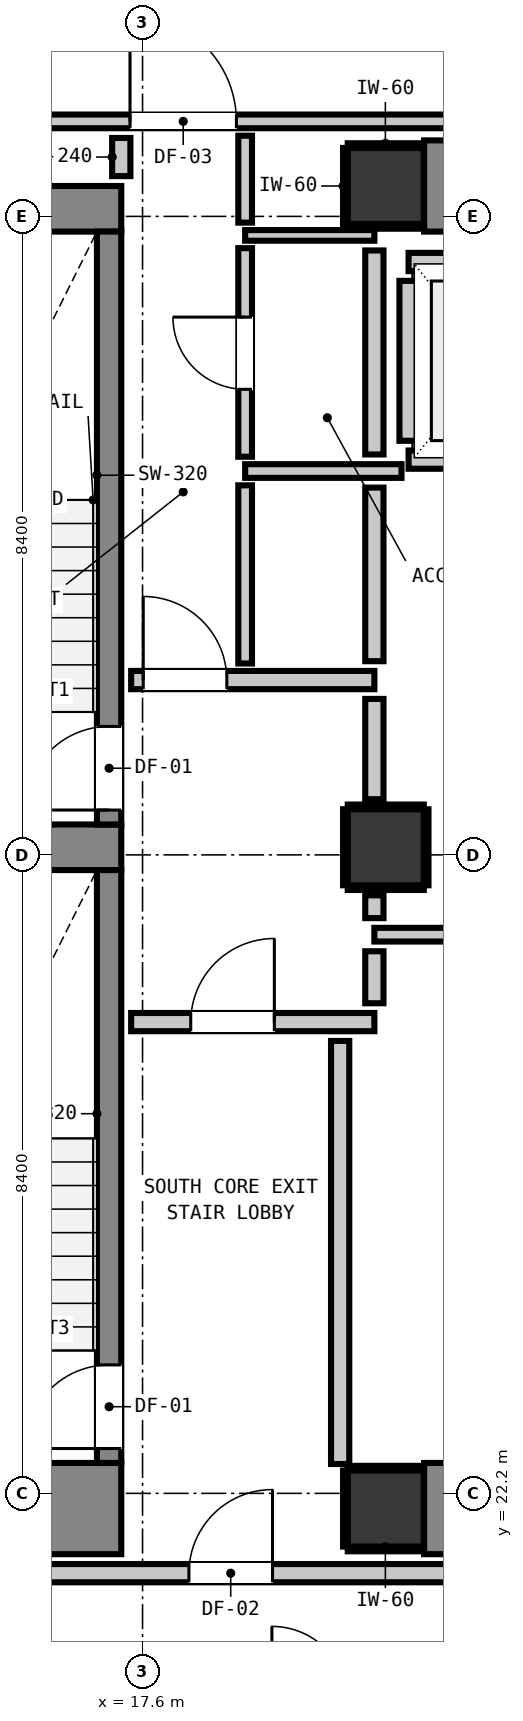
"""IFC4 building model, lengths in metres.
Left out: names, types, materials, properties, quantities, classifications, styles, units other than length and angle.
Written with IfcOpenShell. Run it as: python <this file> out.ifc"""

import sys

from ifc_helpers import new_model, si_unit, direction, frame, frame_2d, origin, origin_2d, place, context, subcontext, project, spatial, rectangle, extrude, element, fill, save


model = new_model("IFC4")
c1 = context("Model", 3, precision=1e-05, world=origin(), true_north=direction((0.0, 1.0)))
c2 = subcontext(c1, "Body", "Model", "MODEL_VIEW")
j1 = project(units=[si_unit("LENGTHUNIT", "METRE"), si_unit("PLANEANGLEUNIT", "RADIAN")], contexts=[c1])
p1 = place(None, origin())
s1 = spatial("IfcSite", under=j1, at=p1, CompositionType="ELEMENT")
p2 = place(p1, origin())
s2 = spatial("IfcBuilding", under=s1, at=p2, CompositionType="ELEMENT")
p3 = place(p2, frame((0.0, 0.0, 25.32)))
s3 = spatial("IfcBuildingStorey", under=s2, at=p3, CompositionType="ELEMENT", Elevation=25.32)
for number, where, z_axis, x_axis in (
    (1, (20.8, 22.0, 0.0), (0.0, 0.0, 1.0), (1.0, 0.0, 0.0)),
    (2, (20.8, 39.4, 0.0), (0.0, 0.0, 1.0), (1.0, 0.0, 0.0)),
):
    element("IfcColumn", number, at=place(p3, frame(where, z_axis=z_axis, x_axis=x_axis)), inside=s3, PredefinedType="COLUMN", context=c2, shape_type="SweptSolid", body=[
        extrude(rectangle(XDim=1.0, YDim=1.0, at=origin_2d()), origin(), (0.0, 0.0, 1.0), 3.32),
    ])
p4 = place(p3, frame((13.24, 22.0, 0.0), z_axis=(0.0, 0.0, 1.0), x_axis=(1.0, 0.0, 0.0)))
e3 = element("IfcWall", 3, at=p4, inside=s3, PredefinedType="SHEAR", context=c2, shape_type="SweptSolid", body=[
    extrude(rectangle(XDim=4.08, YDim=1.2, at=frame_2d((2.04, 0.0))), origin(), (0.0, 0.0, 1.0), 3.32),
])
p5 = place(p3, frame((13.24, 39.1, 0.0), z_axis=(0.0, 0.0, 1.0), x_axis=(1.0, 0.0, 0.0)))
e4 = element("IfcWall", 4, at=p5, inside=s3, PredefinedType="SHEAR", context=c2, shape_type="SweptSolid", body=[
    extrude(rectangle(XDim=4.08, YDim=0.6, at=frame_2d((2.04, 0.0))), origin(), (0.0, 0.0, 1.0), 3.32),
])
p6 = place(p3, frame((13.905, 30.7, 0.0), z_axis=(0.0, 0.0, 1.0), x_axis=(1.0, 0.0, 0.0)))
e5 = element("IfcWall", 5, at=p6, inside=s3, PredefinedType="SHEAR", context=c2, shape_type="SweptSolid", body=[
    extrude(rectangle(XDim=3.415, YDim=0.6, at=frame_2d((1.708, 0.0))), origin(), (0.0, 0.0, 1.0), 3.32),
])
for number, where, z_axis, x_axis in (
    (6, (21.305, 22.0, 0.0), (0.0, 0.0, 1.0), (1.0, 0.0, 0.0)),
    (7, (21.305, 39.4, 0.0), (0.0, 0.0, 1.0), (1.0, 0.0, 0.0)),
):
    element("IfcWall", number, at=place(p3, frame(where, z_axis=z_axis, x_axis=x_axis)), inside=s3, PredefinedType="SHEAR", context=c2, shape_type="SweptSolid", body=[
        extrude(rectangle(XDim=7.39, YDim=1.2, at=frame_2d((3.695, 0.0))), origin(), (0.0, 0.0, 1.0), 3.32),
    ])
p7 = place(p3, frame((17.16, 31.0, 0.0), z_axis=(0.0, 0.0, 1.0), x_axis=(0.0, 1.0, 0.0)))
e8 = element("IfcWall", 8, at=p7, inside=s3, PredefinedType="SHEAR", context=c2, shape_type="SweptSolid", body=[
    extrude(rectangle(XDim=7.8, YDim=0.32, at=frame_2d((3.9, 0.0))), origin(), (0.0, 0.0, 1.0), 3.32),
])
p8 = place(p7, frame((0.19, 0.0, 0.0)))
e9 = element("IfcOpeningElement", 9, at=p8, cuts=e8, PredefinedType="OPENING", context=c2, shape_type="SweptSolid", body=[
    extrude(rectangle(XDim=1.1, YDim=2.15, at=frame_2d((0.55, 1.075))), frame((0.0, 0.17, 0.0), z_axis=(0.0, -1.0, 0.0), x_axis=(1.0, 0.0, 0.0)), (0.0, 0.0, 1.0), 0.34),
])
p9 = place(p3, frame((17.16, 22.6, 0.0), z_axis=(0.0, 0.0, 1.0), x_axis=(0.0, 1.0, 0.0)))
e10 = element("IfcWall", 10, at=p9, inside=s3, PredefinedType="SHEAR", context=c2, shape_type="SweptSolid", body=[
    extrude(rectangle(XDim=7.8, YDim=0.32, at=frame_2d((3.9, 0.0))), origin(), (0.0, 0.0, 1.0), 3.32),
])
p10 = place(p9, frame((0.19, 0.0, 0.0)))
e11 = element("IfcOpeningElement", 11, at=p10, cuts=e10, PredefinedType="OPENING", context=c2, shape_type="SweptSolid", body=[
    extrude(rectangle(XDim=1.1, YDim=2.15, at=frame_2d((0.55, 1.075))), frame((0.0, 0.17, 0.0), z_axis=(0.0, -1.0, 0.0), x_axis=(1.0, 0.0, 0.0)), (0.0, 0.0, 1.0), 0.34),
])
p11 = place(p3, frame((20.8, 30.7, 0.0), z_axis=(0.0, 0.0, 1.0), x_axis=(1.0, 0.0, 0.0)))
e12 = element("IfcColumn", 12, at=p11, inside=s3, PredefinedType="COLUMN", context=c2, shape_type="SweptSolid", body=[
    extrude(rectangle(XDim=1.0, YDim=1.0, at=origin_2d()), origin(), (0.0, 0.0, 1.0), 3.32),
])
for number, where, z_axis, x_axis in (
    (13, (21.1, 35.8, 0.0), (0.0, 0.0, 1.0), (1.0, 0.0, 0.0)),
    (14, (21.1, 38.4, 0.0), (0.0, 0.0, 1.0), (1.0, 0.0, 0.0)),
):
    element("IfcWall", number, at=place(p3, frame(where, z_axis=z_axis, x_axis=x_axis)), inside=s3, PredefinedType="PARTITIONING", context=c2, shape_type="SweptSolid", body=[
        extrude(rectangle(XDim=2.2, YDim=0.24, at=frame_2d((1.1, 0.0))), origin(), (0.0, 0.0, 1.0), 3.06),
    ])
p12 = place(p3, frame((21.1, 36.048, 0.0), z_axis=(0.0, 0.0, 1.0), x_axis=(0.0, 1.0, 0.0)))
e15 = element("IfcWall", 15, at=p12, inside=s3, PredefinedType="PARTITIONING", context=c2, shape_type="SweptSolid", body=[
    extrude(rectangle(XDim=2.104, YDim=0.24, at=frame_2d((1.052, 0.0))), origin(), (0.0, 0.0, 1.0), 2.295),
])
p13 = place(p3, frame((1.827, 21.15, 0.0), z_axis=(0.0, 0.0, 1.0), x_axis=(1.0, 0.0, 0.0)))
e16 = element("IfcWall", 16, at=p13, inside=s3, PredefinedType="PARTITIONING", context=c2, shape_type="SweptSolid", body=[
    extrude(rectangle(XDim=42.146, YDim=0.24, at=frame_2d((21.073, 0.0))), origin(), (0.0, 0.0, 1.0), 3.06),
])
p14 = place(p13, frame((16.383, 0.0, 0.0)))
e17 = element("IfcOpeningElement", 17, at=p14, cuts=e16, PredefinedType="OPENING", context=c2, shape_type="SweptSolid", body=[
    extrude(rectangle(XDim=1.1, YDim=2.15, at=frame_2d((0.55, 1.075))), frame((0.0, 0.13, 0.0), z_axis=(0.0, -1.0, 0.0), x_axis=(1.0, 0.0, 0.0)), (0.0, 0.0, 1.0), 0.26),
])
p15 = place(p13, frame((8.647, 0.0, 0.0)))
e18 = element("IfcOpeningElement", 18, at=p15, cuts=e16, PredefinedType="OPENING", context=c2, shape_type="SweptSolid", body=[
    extrude(rectangle(XDim=1.4, YDim=2.15, at=frame_2d((0.7, 1.075))), frame((0.0, 0.13, 0.0), z_axis=(0.0, -1.0, 0.0), x_axis=(1.0, 0.0, 0.0)), (0.0, 0.0, 1.0), 0.26),
])
p16 = place(p13, frame((38.524, 0.0, 0.0)))
e19 = element("IfcOpeningElement", 19, at=p16, cuts=e16, PredefinedType="OPENING", context=c2, shape_type="SweptSolid", body=[
    extrude(rectangle(XDim=1.0, YDim=2.15, at=frame_2d((0.5, 1.075))), frame((0.0, 0.13, 0.0), z_axis=(0.0, -1.0, 0.0), x_axis=(1.0, 0.0, 0.0)), (0.0, 0.0, 1.0), 0.26),
])
p17 = place(p3, frame((17.45, 28.4, 0.0), z_axis=(0.0, 0.0, 1.0), x_axis=(1.0, 0.0, 0.0)))
e20 = element("IfcWall", 20, at=p17, inside=s3, PredefinedType="PARTITIONING", context=c2, shape_type="SweptSolid", body=[
    extrude(rectangle(XDim=3.2, YDim=0.24, at=frame_2d((1.6, 0.0))), origin(), (0.0, 0.0, 1.0), 3.06),
])
p18 = place(p17, frame((0.784, 0.0, 0.0)))
e21 = element("IfcOpeningElement", 21, at=p18, cuts=e20, PredefinedType="OPENING", context=c2, shape_type="SweptSolid", body=[
    extrude(rectangle(XDim=1.1, YDim=2.15, at=frame_2d((0.55, 1.075))), frame((0.0, 0.13, 0.0), z_axis=(0.0, -1.0, 0.0), x_axis=(1.0, 0.0, 0.0)), (0.0, 0.0, 1.0), 0.26),
])
p19 = place(p3, frame((17.45, 32.9, 0.0), z_axis=(0.0, 0.0, 1.0), x_axis=(1.0, 0.0, 0.0)))
e22 = element("IfcWall", 22, at=p19, inside=s3, PredefinedType="PARTITIONING", context=c2, shape_type="SweptSolid", body=[
    extrude(rectangle(XDim=3.2, YDim=0.24, at=frame_2d((1.6, 0.0))), origin(), (0.0, 0.0, 1.0), 3.06),
])
p20 = place(p19, frame((0.159, 0.0, 0.0)))
e23 = element("IfcOpeningElement", 23, at=p20, cuts=e22, PredefinedType="OPENING", context=c2, shape_type="SweptSolid", body=[
    extrude(rectangle(XDim=1.1, YDim=2.15, at=frame_2d((0.55, 1.075))), frame((0.0, 0.13, 0.0), z_axis=(0.0, -1.0, 0.0), x_axis=(1.0, 0.0, 0.0)), (0.0, 0.0, 1.0), 0.26),
])
p21 = place(p3, frame((20.65, 29.55, 0.0), z_axis=(0.0, 0.0, 1.0), x_axis=(1.0, 0.0, 0.0)))
e24 = element("IfcWall", 24, at=p21, inside=s3, PredefinedType="PARTITIONING", context=c2, shape_type="SweptSolid", body=[
    extrude(rectangle(XDim=9.325, YDim=0.18, at=frame_2d((4.663, 0.0))), origin(), (0.0, 0.0, 1.0), 3.06),
])
p22 = place(p3, frame((18.95, 35.65, 0.0), z_axis=(0.0, 0.0, 1.0), x_axis=(1.0, 0.0, 0.0)))
e25 = element("IfcWall", 25, at=p22, inside=s3, PredefinedType="PARTITIONING", context=c2, shape_type="SweptSolid", body=[
    extrude(rectangle(XDim=2.057, YDim=0.18, at=frame_2d((1.029, 0.0))), origin(), (0.0, 0.0, 1.0), 3.06),
])
p23 = place(p3, frame((12.989, 40.25, 0.0), z_axis=(0.0, 0.0, 1.0), x_axis=(1.0, 0.0, 0.0)))
e26 = element("IfcWall", 26, at=p23, inside=s3, PredefinedType="PARTITIONING", context=c2, shape_type="SweptSolid", body=[
    extrude(rectangle(XDim=30.984, YDim=0.18, at=frame_2d((15.492, 0.0))), origin(), (0.0, 0.0, 1.0), 3.06),
])
p24 = place(p23, frame((4.446, 0.0, 0.0)))
e27 = element("IfcOpeningElement", 27, at=p24, cuts=e26, PredefinedType="OPENING", context=c2, shape_type="SweptSolid", body=[
    extrude(rectangle(XDim=1.4, YDim=2.15, at=frame_2d((0.7, 1.075))), frame((0.0, 0.1, 0.0), z_axis=(0.0, -1.0, 0.0), x_axis=(1.0, 0.0, 0.0)), (0.0, 0.0, 1.0), 0.2),
])
p25 = place(p23, frame((27.362, 0.0, 0.0)))
e28 = element("IfcOpeningElement", 28, at=p25, cuts=e26, PredefinedType="OPENING", context=c2, shape_type="SweptSolid", body=[
    extrude(rectangle(XDim=1.0, YDim=2.15, at=frame_2d((0.5, 1.075))), frame((0.0, 0.1, 0.0), z_axis=(0.0, -1.0, 0.0), x_axis=(1.0, 0.0, 0.0)), (0.0, 0.0, 1.0), 0.2),
])
p26 = place(p3, frame((18.95, 38.75, 0.0), z_axis=(0.0, 0.0, 1.0), x_axis=(1.0, 0.0, 0.0)))
e29 = element("IfcWall", 29, at=p26, inside=s3, PredefinedType="PARTITIONING", context=c2, shape_type="SweptSolid", body=[
    extrude(rectangle(XDim=1.7, YDim=0.14, at=frame_2d((0.85, 0.0))), origin(), (0.0, 0.0, 1.0), 3.06),
])
p27 = place(p3, frame((17.32, 39.53, 0.0), z_axis=(0.0, 0.0, 1.0), x_axis=(0.0, 1.0, 0.0)))
e30 = element("IfcWall", 30, at=p27, inside=s3, PredefinedType="PARTITIONING", context=c2, shape_type="SweptSolid", body=[
    extrude(rectangle(XDim=0.502, YDim=0.24, at=frame_2d((0.251, 0.0))), origin(), (0.0, 0.0, 1.0), 3.06),
])
p28 = place(p3, frame((20.2, 22.586, 0.0), z_axis=(0.0, 0.0, 1.0), x_axis=(0.0, 1.0, 0.0)))
e31 = element("IfcWall", 31, at=p28, inside=s3, PredefinedType="PARTITIONING", context=c2, shape_type="SweptSolid", body=[
    extrude(rectangle(XDim=5.566, YDim=0.24, at=frame_2d((2.783, 0.0))), origin(), (0.0, 0.0, 1.0), 3.06),
])
p29 = place(p3, frame((20.65, 28.648, 0.0), z_axis=(0.0, 0.0, 1.0), x_axis=(0.0, 1.0, 0.0)))
e32 = element("IfcWall", 32, at=p29, inside=s3, PredefinedType="PARTITIONING", context=c2, shape_type="SweptSolid", body=[
    extrude(rectangle(XDim=0.684, YDim=0.24, at=frame_2d((0.342, 0.0))), origin(), (0.0, 0.0, 1.0), 2.295),
])
p30 = place(p3, frame((20.65, 29.768, 0.0), z_axis=(0.0, 0.0, 1.0), x_axis=(0.0, 1.0, 0.0)))
e33 = element("IfcWall", 33, at=p30, inside=s3, PredefinedType="PARTITIONING", context=c2, shape_type="SweptSolid", body=[
    extrude(rectangle(XDim=0.3, YDim=0.24, at=frame_2d((0.15, 0.0))), origin(), (0.0, 0.0, 1.0), 2.295),
])
p31 = place(p3, frame((20.65, 31.332, 0.0), z_axis=(0.0, 0.0, 1.0), x_axis=(0.0, 1.0, 0.0)))
e34 = element("IfcWall", 34, at=p31, inside=s3, PredefinedType="PARTITIONING", context=c2, shape_type="SweptSolid", body=[
    extrude(rectangle(XDim=1.32, YDim=0.24, at=frame_2d((0.66, 0.0))), origin(), (0.0, 0.0, 1.0), 2.295),
])
p32 = place(p3, frame((20.65, 33.148, 0.0), z_axis=(0.0, 0.0, 1.0), x_axis=(0.0, 1.0, 0.0)))
e35 = element("IfcWall", 35, at=p32, inside=s3, PredefinedType="PARTITIONING", context=c2, shape_type="SweptSolid", body=[
    extrude(rectangle(XDim=2.284, YDim=0.24, at=frame_2d((1.142, 0.0))), origin(), (0.0, 0.0, 1.0), 2.295),
])
p33 = place(p3, frame((20.65, 35.868, 0.0), z_axis=(0.0, 0.0, 1.0), x_axis=(0.0, 1.0, 0.0)))
e36 = element("IfcWall", 36, at=p33, inside=s3, PredefinedType="PARTITIONING", context=c2, shape_type="SweptSolid", body=[
    extrude(rectangle(XDim=2.684, YDim=0.24, at=frame_2d((1.342, 0.0))), origin(), (0.0, 0.0, 1.0), 2.295),
])
p34 = place(p3, frame((18.95, 33.118, 0.0), z_axis=(0.0, 0.0, 1.0), x_axis=(0.0, 1.0, 0.0)))
e37 = element("IfcWall", 37, at=p34, inside=s3, PredefinedType="PARTITIONING", context=c2, shape_type="SweptSolid", body=[
    extrude(rectangle(XDim=2.344, YDim=0.18, at=frame_2d((1.172, 0.0))), origin(), (0.0, 0.0, 1.0), 3.06),
])
p35 = place(p3, frame((18.95, 35.838, 0.0), z_axis=(0.0, 0.0, 1.0), x_axis=(0.0, 1.0, 0.0)))
e38 = element("IfcWall", 38, at=p35, inside=s3, PredefinedType="PARTITIONING", context=c2, shape_type="SweptSolid", body=[
    extrude(rectangle(XDim=2.744, YDim=0.18, at=frame_2d((1.372, 0.0))), origin(), (0.0, 0.0, 1.0), 3.06),
])
p36 = place(p35, frame((0.887, 0.0, 0.0)))
e39 = element("IfcOpeningElement", 39, at=p36, cuts=e38, PredefinedType="OPENING", context=c2, shape_type="SweptSolid", body=[
    extrude(rectangle(XDim=0.95, YDim=2.1, at=frame_2d((0.475, 1.05))), frame((0.0, 0.1, 0.0), z_axis=(0.0, -1.0, 0.0), x_axis=(1.0, 0.0, 0.0)), (0.0, 0.0, 1.0), 0.2),
])
p37 = place(p3, frame((18.95, 38.918, 0.0), z_axis=(0.0, 0.0, 1.0), x_axis=(0.0, 1.0, 0.0)))
e40 = element("IfcWall", 40, at=p37, inside=s3, PredefinedType="PARTITIONING", context=c2, shape_type="SweptSolid", body=[
    extrude(rectangle(XDim=1.144, YDim=0.18, at=frame_2d((0.572, 0.0))), origin(), (0.0, 0.0, 1.0), 3.06),
])
for number, where, z_axis, x_axis in (
    (41, (20.3, 21.468, 0.0), (0.0, 0.0, 1.0), (1.0, 0.0, 0.0)),
    (42, (20.3, 22.532, 0.0), (0.0, 0.0, 1.0), (1.0, 0.0, 0.0)),
):
    element("IfcWall", number, at=place(p3, frame(where, z_axis=z_axis, x_axis=x_axis)), inside=s3, PredefinedType="PARTITIONING", context=c2, shape_type="SweptSolid", body=[
        extrude(rectangle(XDim=0.99, YDim=0.06, at=frame_2d((0.495, 0.0))), origin(), (0.0, 0.0, 1.0), 1.45),
    ])
p38 = place(p3, frame((20.268, 21.5, 0.0), z_axis=(0.0, 0.0, 1.0), x_axis=(0.0, 1.0, 0.0)))
e43 = element("IfcWall", 43, at=p38, inside=s3, PredefinedType="PARTITIONING", context=c2, shape_type="SweptSolid", body=[
    extrude(rectangle(XDim=1.0, YDim=0.06, at=frame_2d((0.5, 0.0))), origin(), (0.0, 0.0, 1.0), 1.45),
])
for number, where, z_axis, x_axis in (
    (44, (20.3, 38.868, 0.0), (0.0, 0.0, 1.0), (1.0, 0.0, 0.0)),
    (45, (20.3, 39.932, 0.0), (0.0, 0.0, 1.0), (1.0, 0.0, 0.0)),
):
    element("IfcWall", number, at=place(p3, frame(where, z_axis=z_axis, x_axis=x_axis)), inside=s3, PredefinedType="PARTITIONING", context=c2, shape_type="SweptSolid", body=[
        extrude(rectangle(XDim=0.99, YDim=0.06, at=frame_2d((0.495, 0.0))), origin(), (0.0, 0.0, 1.0), 1.45),
    ])
for number, where, z_axis, x_axis in (
    (46, (20.268, 38.9, 0.0), (0.0, 0.0, 1.0), (0.0, 1.0, 0.0)),
    (47, (20.3, 30.168, 0.0), (0.0, 0.0, 1.0), (1.0, 0.0, 0.0)),
    (48, (20.3, 31.232, 0.0), (0.0, 0.0, 1.0), (1.0, 0.0, 0.0)),
    (49, (20.268, 30.2, 0.0), (0.0, 0.0, 1.0), (0.0, 1.0, 0.0)),
    (50, (21.332, 30.2, 0.0), (0.0, 0.0, 1.0), (0.0, 1.0, 0.0)),
):
    element("IfcWall", number, at=place(p3, frame(where, z_axis=z_axis, x_axis=x_axis)), inside=s3, PredefinedType="PARTITIONING", context=c2, shape_type="SweptSolid", body=[
        extrude(rectangle(XDim=1.0, YDim=0.06, at=frame_2d((0.5, 0.0))), origin(), (0.0, 0.0, 1.0), 1.45),
    ])
p39 = place(p8, origin())
e51 = element("IfcDoor", 51, at=p39, inside=s3, OperationType="SINGLE_SWING_LEFT", PredefinedType="DOOR", context=c2, shape_type="SweptSolid", body=[
    extrude(rectangle(XDim=1.1, YDim=2.15, at=frame_2d((0.55, 1.075))), frame((0.0, 0.025, 0.0), z_axis=(0.0, -1.0, 0.0), x_axis=(1.0, 0.0, 0.0)), (0.0, 0.0, 1.0), 0.05),
])
fill(e9, e51)
p40 = place(p10, origin())
e52 = element("IfcDoor", 52, at=p40, inside=s3, OperationType="SINGLE_SWING_LEFT", PredefinedType="DOOR", context=c2, shape_type="SweptSolid", body=[
    extrude(rectangle(XDim=1.1, YDim=2.15, at=frame_2d((0.55, 1.075))), frame((0.0, 0.025, 0.0), z_axis=(0.0, -1.0, 0.0), x_axis=(1.0, 0.0, 0.0)), (0.0, 0.0, 1.0), 0.05),
])
fill(e11, e52)
p41 = place(p18, origin())
e53 = element("IfcDoor", 53, at=p41, inside=s3, OperationType="SINGLE_SWING_RIGHT", PredefinedType="DOOR", context=c2, shape_type="SweptSolid", body=[
    extrude(rectangle(XDim=1.1, YDim=2.15, at=frame_2d((0.55, 1.075))), frame((0.0, 0.025, 0.0), z_axis=(0.0, -1.0, 0.0), x_axis=(1.0, 0.0, 0.0)), (0.0, 0.0, 1.0), 0.05),
])
fill(e21, e53)
p42 = place(p20, origin())
e54 = element("IfcDoor", 54, at=p42, inside=s3, OperationType="SINGLE_SWING_LEFT", PredefinedType="DOOR", context=c2, shape_type="SweptSolid", body=[
    extrude(rectangle(XDim=1.1, YDim=2.15, at=frame_2d((0.55, 1.075))), frame((0.0, 0.025, 0.0), z_axis=(0.0, -1.0, 0.0), x_axis=(1.0, 0.0, 0.0)), (0.0, 0.0, 1.0), 0.05),
])
fill(e23, e54)
p43 = place(p14, origin())
e55 = element("IfcDoor", 55, at=p43, inside=s3, OperationType="SINGLE_SWING_RIGHT", PredefinedType="DOOR", context=c2, shape_type="SweptSolid", body=[
    extrude(rectangle(XDim=1.1, YDim=2.15, at=frame_2d((0.55, 1.075))), frame((0.0, 0.025, 0.0), z_axis=(0.0, -1.0, 0.0), x_axis=(1.0, 0.0, 0.0)), (0.0, 0.0, 1.0), 0.05),
])
fill(e17, e55)
p44 = place(p24, origin())
e56 = element("IfcDoor", 56, at=p44, inside=s3, OperationType="SINGLE_SWING_LEFT", PredefinedType="DOOR", context=c2, shape_type="SweptSolid", body=[
    extrude(rectangle(XDim=1.4, YDim=2.15, at=frame_2d((0.7, 1.075))), frame((0.0, 0.025, 0.0), z_axis=(0.0, -1.0, 0.0), x_axis=(1.0, 0.0, 0.0)), (0.0, 0.0, 1.0), 0.05),
])
fill(e27, e56)
p45 = place(p36, origin())
e57 = element("IfcDoor", 57, at=p45, inside=s3, OperationType="SINGLE_SWING_RIGHT", PredefinedType="DOOR", context=c2, shape_type="SweptSolid", body=[
    extrude(rectangle(XDim=0.95, YDim=2.1, at=frame_2d((0.475, 1.05))), frame((0.0, 0.025, 0.0), z_axis=(0.0, -1.0, 0.0), x_axis=(1.0, 0.0, 0.0)), (0.0, 0.0, 1.0), 0.05),
])
fill(e39, e57)
save(model, sys.argv[1])
